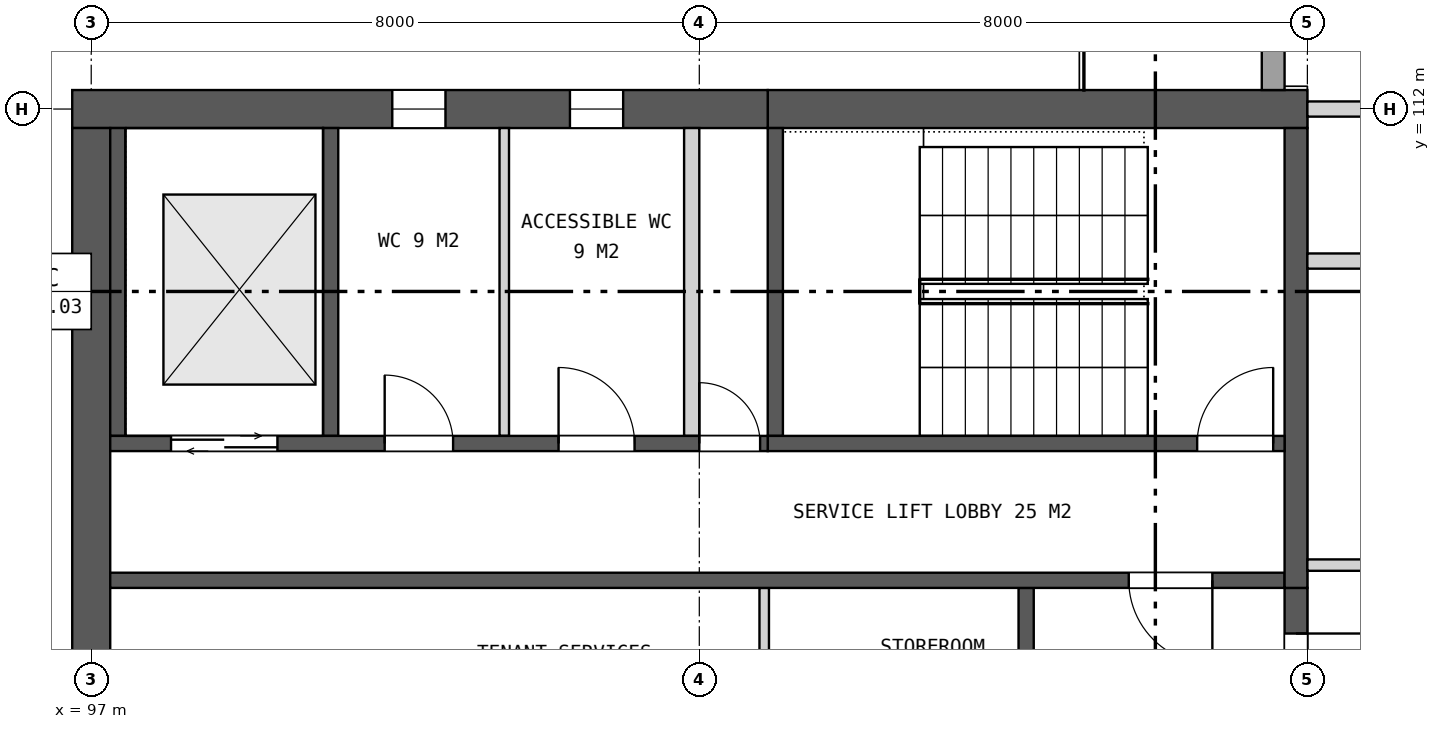
"""IFC4 building model, lengths in metres.
Left out: names, types, materials, properties, quantities, classifications, styles, units other than length and angle.
Written with IfcOpenShell. Run it as: python <this file> out.ifc"""

import sys

from ifc_helpers import new_model, si_unit, direction, frame, frame_2d, origin, place, context, subcontext, project, spatial, rectangle, extrude, element, fill, save


model = new_model("IFC4")
c1 = context("Model", 3, precision=1e-05, world=origin(), true_north=direction((0.0, 1.0)))
c2 = subcontext(c1, "Body", "Model", "MODEL_VIEW")
j1 = project(units=[si_unit("LENGTHUNIT", "METRE"), si_unit("PLANEANGLEUNIT", "RADIAN")], contexts=[c1])
p1 = place(None, origin())
s1 = spatial("IfcSite", under=j1, at=p1, CompositionType="ELEMENT")
p2 = place(p1, origin())
s2 = spatial("IfcBuilding", under=s1, at=p2, CompositionType="ELEMENT")
p3 = place(p2, frame((0.0, 0.0, 245.1)))
s3 = spatial("IfcBuildingStorey", under=s2, at=p3, CompositionType="ELEMENT", Elevation=245.1)
p4 = place(p3, frame((113.0, 112.0, 0.0), z_axis=(0.0, 0.0, 1.0), x_axis=(-1.0, 0.0, 0.0)))
e1 = element("IfcWall", 1, at=p4, inside=s3, PredefinedType="SHEAR", context=c2, shape_type="SweptSolid", body=[
    extrude(rectangle(XDim=7.1, YDim=0.5, at=frame_2d((3.55, 0.0))), origin(), (0.0, 0.0, 1.0), 4.2),
])
p5 = place(p3, frame((105.9, 112.0, 0.0), z_axis=(0.0, 0.0, 1.0), x_axis=(-1.0, 0.0, 0.0)))
e2 = element("IfcWall", 2, at=p5, inside=s3, PredefinedType="SHEAR", context=c2, shape_type="SweptSolid", body=[
    extrude(rectangle(XDim=9.15, YDim=0.5, at=frame_2d((4.575, 0.0))), origin(), (0.0, 0.0, 1.0), 4.2),
])
p6 = place(p5, frame((1.902, 0.0, 1.5)))
e3 = element("IfcOpeningElement", 3, at=p6, cuts=e2, PredefinedType="OPENING", context=c2, shape_type="SweptSolid", body=[
    extrude(rectangle(XDim=0.7, YDim=0.9, at=frame_2d((0.35, 0.45))), frame((0.0, 0.26, 0.0), z_axis=(0.0, -1.0, 0.0), x_axis=(1.0, 0.0, 0.0)), (0.0, 0.0, 1.0), 0.52),
])
p7 = place(p5, frame((4.239, 0.0, 1.5)))
e4 = element("IfcOpeningElement", 4, at=p7, cuts=e2, PredefinedType="OPENING", context=c2, shape_type="SweptSolid", body=[
    extrude(rectangle(XDim=0.7, YDim=0.9, at=frame_2d((0.35, 0.45))), frame((0.0, 0.26, 0.0), z_axis=(0.0, -1.0, 0.0), x_axis=(1.0, 0.0, 0.0)), (0.0, 0.0, 1.0), 0.52),
])
p8 = place(p3, frame((97.0, 111.75, 0.0), z_axis=(0.0, 0.0, 1.0), x_axis=(0.0, -1.0, 0.0)))
e5 = element("IfcWall", 5, at=p8, inside=s3, PredefinedType="SHEAR", context=c2, shape_type="SweptSolid", body=[
    extrude(rectangle(XDim=23.5, YDim=0.5, at=frame_2d((11.75, 0.0))), origin(), (0.0, 0.0, 1.0), 4.2),
])
p9 = place(p8, frame((9.95, 0.0, 0.15)))
e6 = element("IfcOpeningElement", 6, at=p9, cuts=e5, PredefinedType="OPENING", context=c2, shape_type="SweptSolid", body=[
    extrude(rectangle(XDim=3.6, YDim=3.0, at=frame_2d((1.8, 1.5))), frame((0.0, 0.26, 0.0), z_axis=(0.0, -1.0, 0.0), x_axis=(1.0, 0.0, 0.0)), (0.0, 0.0, 1.0), 0.52),
])
p10 = place(p3, frame((112.85, 105.7, 0.0), z_axis=(0.0, 0.0, 1.0), x_axis=(0.0, -1.0, 0.0)))
e7 = element("IfcWall", 7, at=p10, inside=s3, PredefinedType="SHEAR", context=c2, shape_type="SweptSolid", body=[
    extrude(rectangle(XDim=11.4, YDim=0.3, at=frame_2d((5.7, 0.0))), origin(), (0.0, 0.0, 1.0), 4.2),
])
p11 = place(p10, frame((0.6, 0.0, 0.0)))
e8 = element("IfcOpeningElement", 8, at=p11, cuts=e7, PredefinedType="OPENING", context=c2, shape_type="SweptSolid", body=[
    extrude(rectangle(XDim=2.4, YDim=2.4, at=frame_2d((1.2, 1.2))), frame((0.0, 0.16, 0.0), z_axis=(0.0, -1.0, 0.0), x_axis=(1.0, 0.0, 0.0)), (0.0, 0.0, 1.0), 0.32),
])
p12 = place(p10, frame((4.5, 0.0, 0.0)))
e9 = element("IfcOpeningElement", 9, at=p12, cuts=e7, PredefinedType="OPENING", context=c2, shape_type="SweptSolid", body=[
    extrude(rectangle(XDim=2.4, YDim=2.4, at=frame_2d((1.2, 1.2))), frame((0.0, 0.16, 0.0), z_axis=(0.0, -1.0, 0.0), x_axis=(1.0, 0.0, 0.0)), (0.0, 0.0, 1.0), 0.32),
])
p13 = place(p10, frame((8.4, 0.0, 0.0)))
e10 = element("IfcOpeningElement", 10, at=p13, cuts=e7, PredefinedType="OPENING", context=c2, shape_type="SweptSolid", body=[
    extrude(rectangle(XDim=2.4, YDim=2.4, at=frame_2d((1.2, 1.2))), frame((0.0, 0.16, 0.0), z_axis=(0.0, -1.0, 0.0), x_axis=(1.0, 0.0, 0.0)), (0.0, 0.0, 1.0), 0.32),
])
p14 = place(p3, frame((109.3, 105.7, 0.0), z_axis=(0.0, 0.0, 1.0), x_axis=(0.0, -1.0, 0.0)))
e11 = element("IfcWall", 11, at=p14, inside=s3, PredefinedType="SHEAR", context=c2, shape_type="SweptSolid", body=[
    extrude(rectangle(XDim=3.0, YDim=0.2, at=frame_2d((1.5, 0.0))), origin(), (0.0, 0.0, 1.0), 4.2),
])
p15 = place(p3, frame((105.854, 105.7, 0.0), z_axis=(0.0, 0.0, 1.0), x_axis=(0.0, -1.0, 0.0)))
e12 = element("IfcWall", 12, at=p15, inside=s3, PredefinedType="PARTITIONING", context=c2, shape_type="SweptSolid", body=[
    extrude(rectangle(XDim=3.0, YDim=0.125, at=frame_2d((1.5, 0.0))), origin(), (0.0, 0.0, 1.0), 4.2),
])
p16 = place(p3, frame((112.7, 105.8, 0.0), z_axis=(0.0, 0.0, 1.0), x_axis=(-1.0, 0.0, 0.0)))
e13 = element("IfcWall", 13, at=p16, inside=s3, PredefinedType="SHEAR", context=c2, shape_type="SweptSolid", body=[
    extrude(rectangle(XDim=15.45, YDim=0.2, at=frame_2d((7.725, 0.0))), origin(), (0.0, 0.0, 1.0), 4.2),
])
p17 = place(p16, frame((0.95, 0.0, 0.0)))
e14 = element("IfcOpeningElement", 14, at=p17, cuts=e13, PredefinedType="OPENING", context=c2, shape_type="SweptSolid", body=[
    extrude(rectangle(XDim=1.1, YDim=2.1, at=frame_2d((0.55, 1.05))), frame((0.0, 0.11, 0.0), z_axis=(0.0, -1.0, 0.0), x_axis=(1.0, 0.0, 0.0)), (0.0, 0.0, 1.0), 0.22),
])
p18 = place(p3, frame((112.85, 111.75, 0.0), z_axis=(0.0, 0.0, 1.0), x_axis=(0.0, -1.0, 0.0)))
e15 = element("IfcWall", 15, at=p18, inside=s3, PredefinedType="SHEAR", context=c2, shape_type="SweptSolid", body=[
    extrude(rectangle(XDim=6.05, YDim=0.3, at=frame_2d((3.025, 0.0))), origin(), (0.0, 0.0, 1.0), 4.2),
])
for number, where, z_axis, x_axis in (
    (16, (106.0, 111.75, 0.0), (0.0, 0.0, 1.0), (0.0, -1.0, 0.0)),
    (17, (100.15, 111.75, 0.0), (0.0, 0.0, 1.0), (0.0, -1.0, 0.0)),
    (18, (97.35, 111.75, 0.0), (0.0, 0.0, 1.0), (0.0, -1.0, 0.0)),
):
    element("IfcWall", number, at=place(p3, frame(where, z_axis=z_axis, x_axis=x_axis)), inside=s3, PredefinedType="SHEAR", context=c2, shape_type="SweptSolid", body=[
        extrude(rectangle(XDim=4.05, YDim=0.2, at=frame_2d((2.025, 0.0))), origin(), (0.0, 0.0, 1.0), 4.2),
    ])
p19 = place(p3, frame((104.9, 111.75, 0.0), z_axis=(0.0, 0.0, 1.0), x_axis=(0.0, -1.0, 0.0)))
e19 = element("IfcWall", 19, at=p19, inside=s3, PredefinedType="PARTITIONING", context=c2, shape_type="SweptSolid", body=[
    extrude(rectangle(XDim=4.05, YDim=0.2, at=frame_2d((2.025, 0.0))), origin(), (0.0, 0.0, 1.0), 4.2),
])
p20 = place(p3, frame((102.434, 111.75, 0.0), z_axis=(0.0, 0.0, 1.0), x_axis=(0.0, -1.0, 0.0)))
e20 = element("IfcWall", 20, at=p20, inside=s3, PredefinedType="PARTITIONING", context=c2, shape_type="SweptSolid", body=[
    extrude(rectangle(XDim=4.05, YDim=0.125, at=frame_2d((2.025, 0.0))), origin(), (0.0, 0.0, 1.0), 4.2),
])
p21 = place(p3, frame((112.7, 107.6, 0.0), z_axis=(0.0, 0.0, 1.0), x_axis=(-1.0, 0.0, 0.0)))
e21 = element("IfcWall", 21, at=p21, inside=s3, PredefinedType="SHEAR", context=c2, shape_type="SweptSolid", body=[
    extrude(rectangle(XDim=6.8, YDim=0.2, at=frame_2d((3.4, 0.0))), origin(), (0.0, 0.0, 1.0), 4.2),
])
p22 = place(p21, frame((0.15, 0.0, 0.0)))
e22 = element("IfcOpeningElement", 22, at=p22, cuts=e21, PredefinedType="OPENING", context=c2, shape_type="SweptSolid", body=[
    extrude(rectangle(XDim=1.0, YDim=2.1, at=frame_2d((0.5, 1.05))), frame((0.0, 0.11, 0.0), z_axis=(0.0, -1.0, 0.0), x_axis=(1.0, 0.0, 0.0)), (0.0, 0.0, 1.0), 0.22),
])
p23 = place(p3, frame((105.9, 107.6, 0.0), z_axis=(0.0, 0.0, 1.0), x_axis=(-1.0, 0.0, 0.0)))
e23 = element("IfcWall", 23, at=p23, inside=s3, PredefinedType="SHEAR", context=c2, shape_type="SweptSolid", body=[
    extrude(rectangle(XDim=8.65, YDim=0.2, at=frame_2d((4.325, 0.0))), origin(), (0.0, 0.0, 1.0), 4.2),
])
p24 = place(p23, frame((0.1, 0.0, 0.0)))
e24 = element("IfcOpeningElement", 24, at=p24, cuts=e23, PredefinedType="OPENING", context=c2, shape_type="SweptSolid", body=[
    extrude(rectangle(XDim=0.8, YDim=2.1, at=frame_2d((0.4, 1.05))), frame((0.0, 0.11, 0.0), z_axis=(0.0, -1.0, 0.0), x_axis=(1.0, 0.0, 0.0)), (0.0, 0.0, 1.0), 0.22),
])
p25 = place(p23, frame((1.752, 0.0, 0.0)))
e25 = element("IfcOpeningElement", 25, at=p25, cuts=e23, PredefinedType="OPENING", context=c2, shape_type="SweptSolid", body=[
    extrude(rectangle(XDim=1.0, YDim=2.1, at=frame_2d((0.5, 1.05))), frame((0.0, 0.11, 0.0), z_axis=(0.0, -1.0, 0.0), x_axis=(1.0, 0.0, 0.0)), (0.0, 0.0, 1.0), 0.22),
])
p26 = place(p23, frame((4.139, 0.0, 0.0)))
e26 = element("IfcOpeningElement", 26, at=p26, cuts=e23, PredefinedType="OPENING", context=c2, shape_type="SweptSolid", body=[
    extrude(rectangle(XDim=0.9, YDim=2.1, at=frame_2d((0.45, 1.05))), frame((0.0, 0.11, 0.0), z_axis=(0.0, -1.0, 0.0), x_axis=(1.0, 0.0, 0.0)), (0.0, 0.0, 1.0), 0.22),
])
p27 = place(p23, frame((6.45, 0.0, 0.0)))
e27 = element("IfcOpeningElement", 27, at=p27, cuts=e23, PredefinedType="OPENING", context=c2, shape_type="SweptSolid", body=[
    extrude(rectangle(XDim=1.4, YDim=2.1, at=frame_2d((0.7, 1.05))), frame((0.0, 0.11, 0.0), z_axis=(0.0, -1.0, 0.0), x_axis=(1.0, 0.0, 0.0)), (0.0, 0.0, 1.0), 0.22),
])
p28 = place(p3, frame((112.55, 119.965, 0.0), z_axis=(0.0, 0.0, 1.0), x_axis=(0.0, -1.0, 0.0)))
e28 = element("IfcWall", 28, at=p28, inside=s3, PredefinedType="SOLIDWALL", context=c2, shape_type="SweptSolid", body=[
    extrude(rectangle(XDim=7.715, YDim=0.3, at=frame_2d((3.857, 0.0))), origin(), (0.0, 0.0, 1.0), 3.9),
])
p29 = place(p28, frame((2.765, 0.0, 0.0)))
e29 = element("IfcOpeningElement", 29, at=p29, cuts=e28, PredefinedType="OPENING", context=c2, shape_type="SweptSolid", body=[
    extrude(rectangle(XDim=2.4, YDim=2.4, at=frame_2d((1.2, 1.2))), frame((0.0, 0.16, 0.0), z_axis=(0.0, -1.0, 0.0), x_axis=(1.0, 0.0, 0.0)), (0.0, 0.0, 1.0), 0.32),
])
p30 = place(p3, frame((113.0, 106.0, 0.0), z_axis=(0.0, 0.0, 1.0), x_axis=(1.0, 0.0, 0.0)))
e30 = element("IfcWall", 30, at=p30, inside=s3, PredefinedType="PARTITIONING", context=c2, shape_type="SweptSolid", body=[
    extrude(rectangle(XDim=5.5, YDim=0.15, at=frame_2d((2.75, 0.0))), origin(), (0.0, 0.0, 1.0), 3.443),
])
for number, where, z_axis, x_axis in (
    (31, (113.0, 110.0, 0.0), (0.0, 0.0, 1.0), (1.0, 0.0, 0.0)),
    (32, (113.0, 112.0, 0.0), (0.0, 0.0, 1.0), (1.0, 0.0, 0.0)),
):
    element("IfcWall", number, at=place(p3, frame(where, z_axis=z_axis, x_axis=x_axis)), inside=s3, PredefinedType="SOLIDWALL", context=c2, shape_type="SweptSolid", body=[
        extrude(rectangle(XDim=5.5, YDim=0.2, at=frame_2d((2.75, 0.0))), origin(), (0.0, 0.0, 1.0), 3.443),
    ])
p31 = place(p6, origin())
e33 = element("IfcWindow", 33, at=p31, inside=s3, PartitioningType="SINGLE_PANEL", PredefinedType="WINDOW", context=c2, shape_type="SweptSolid", body=[
    extrude(rectangle(XDim=0.7, YDim=0.9, at=frame_2d((0.35, 0.45))), frame((0.0, 0.03, 0.0), z_axis=(0.0, -1.0, 0.0), x_axis=(1.0, 0.0, 0.0)), (0.0, 0.0, 1.0), 0.06),
])
fill(e3, e33)
p32 = place(p7, origin())
e34 = element("IfcWindow", 34, at=p32, inside=s3, PartitioningType="SINGLE_PANEL", PredefinedType="WINDOW", context=c2, shape_type="SweptSolid", body=[
    extrude(rectangle(XDim=0.7, YDim=0.9, at=frame_2d((0.35, 0.45))), frame((0.0, 0.03, 0.0), z_axis=(0.0, -1.0, 0.0), x_axis=(1.0, 0.0, 0.0)), (0.0, 0.0, 1.0), 0.06),
])
fill(e4, e34)
p33 = place(p11, origin())
e35 = element("IfcDoor", 35, at=p33, inside=s3, OperationType="DOUBLE_DOOR_SINGLE_SWING", PredefinedType="DOOR", context=c2, shape_type="SweptSolid", body=[
    extrude(rectangle(XDim=2.4, YDim=2.4, at=frame_2d((1.2, 1.2))), frame((0.0, 0.025, 0.0), z_axis=(0.0, -1.0, 0.0), x_axis=(1.0, 0.0, 0.0)), (0.0, 0.0, 1.0), 0.05),
])
fill(e8, e35)
p34 = place(p17, origin())
e36 = element("IfcDoor", 36, at=p34, inside=s3, OperationType="SINGLE_SWING_LEFT", PredefinedType="DOOR", context=c2, shape_type="SweptSolid", body=[
    extrude(rectangle(XDim=1.1, YDim=2.1, at=frame_2d((0.55, 1.05))), frame((0.0, 0.025, 0.0), z_axis=(0.0, -1.0, 0.0), x_axis=(1.0, 0.0, 0.0)), (0.0, 0.0, 1.0), 0.05),
])
fill(e14, e36)
p35 = place(p22, frame((1.0, 0.0, 0.0), z_axis=(0.0, 0.0, 1.0), x_axis=(-1.0, 0.0, 0.0)))
e37 = element("IfcDoor", 37, at=p35, inside=s3, OperationType="SINGLE_SWING_RIGHT", PredefinedType="DOOR", context=c2, shape_type="SweptSolid", body=[
    extrude(rectangle(XDim=1.0, YDim=2.1, at=frame_2d((0.5, 1.05))), frame((0.0, 0.025, 0.0), z_axis=(0.0, -1.0, 0.0), x_axis=(1.0, 0.0, 0.0)), (0.0, 0.0, 1.0), 0.05),
])
fill(e22, e37)
p36 = place(p24, frame((0.8, 0.0, 0.0), z_axis=(0.0, 0.0, 1.0), x_axis=(-1.0, 0.0, 0.0)))
e38 = element("IfcDoor", 38, at=p36, inside=s3, OperationType="SINGLE_SWING_LEFT", PredefinedType="DOOR", context=c2, shape_type="SweptSolid", body=[
    extrude(rectangle(XDim=0.8, YDim=2.1, at=frame_2d((0.4, 1.05))), frame((0.0, 0.025, 0.0), z_axis=(0.0, -1.0, 0.0), x_axis=(1.0, 0.0, 0.0)), (0.0, 0.0, 1.0), 0.05),
])
fill(e24, e38)
p37 = place(p25, frame((1.0, 0.0, 0.0), z_axis=(0.0, 0.0, 1.0), x_axis=(-1.0, 0.0, 0.0)))
e39 = element("IfcDoor", 39, at=p37, inside=s3, OperationType="SINGLE_SWING_LEFT", PredefinedType="DOOR", context=c2, shape_type="SweptSolid", body=[
    extrude(rectangle(XDim=1.0, YDim=2.1, at=frame_2d((0.5, 1.05))), frame((0.0, 0.025, 0.0), z_axis=(0.0, -1.0, 0.0), x_axis=(1.0, 0.0, 0.0)), (0.0, 0.0, 1.0), 0.05),
])
fill(e25, e39)
p38 = place(p26, frame((0.9, 0.0, 0.0), z_axis=(0.0, 0.0, 1.0), x_axis=(-1.0, 0.0, 0.0)))
e40 = element("IfcDoor", 40, at=p38, inside=s3, OperationType="SINGLE_SWING_LEFT", PredefinedType="DOOR", context=c2, shape_type="SweptSolid", body=[
    extrude(rectangle(XDim=0.9, YDim=2.1, at=frame_2d((0.45, 1.05))), frame((0.0, 0.025, 0.0), z_axis=(0.0, -1.0, 0.0), x_axis=(1.0, 0.0, 0.0)), (0.0, 0.0, 1.0), 0.05),
])
fill(e26, e40)
p39 = place(p27, origin())
e41 = element("IfcDoor", 41, at=p39, inside=s3, OperationType="DOUBLE_DOOR_SLIDING", PredefinedType="DOOR", context=c2, shape_type="SweptSolid", body=[
    extrude(rectangle(XDim=1.4, YDim=2.1, at=frame_2d((0.7, 1.05))), frame((0.0, 0.025, 0.0), z_axis=(0.0, -1.0, 0.0), x_axis=(1.0, 0.0, 0.0)), (0.0, 0.0, 1.0), 0.05),
])
fill(e27, e41)
save(model, sys.argv[1])
